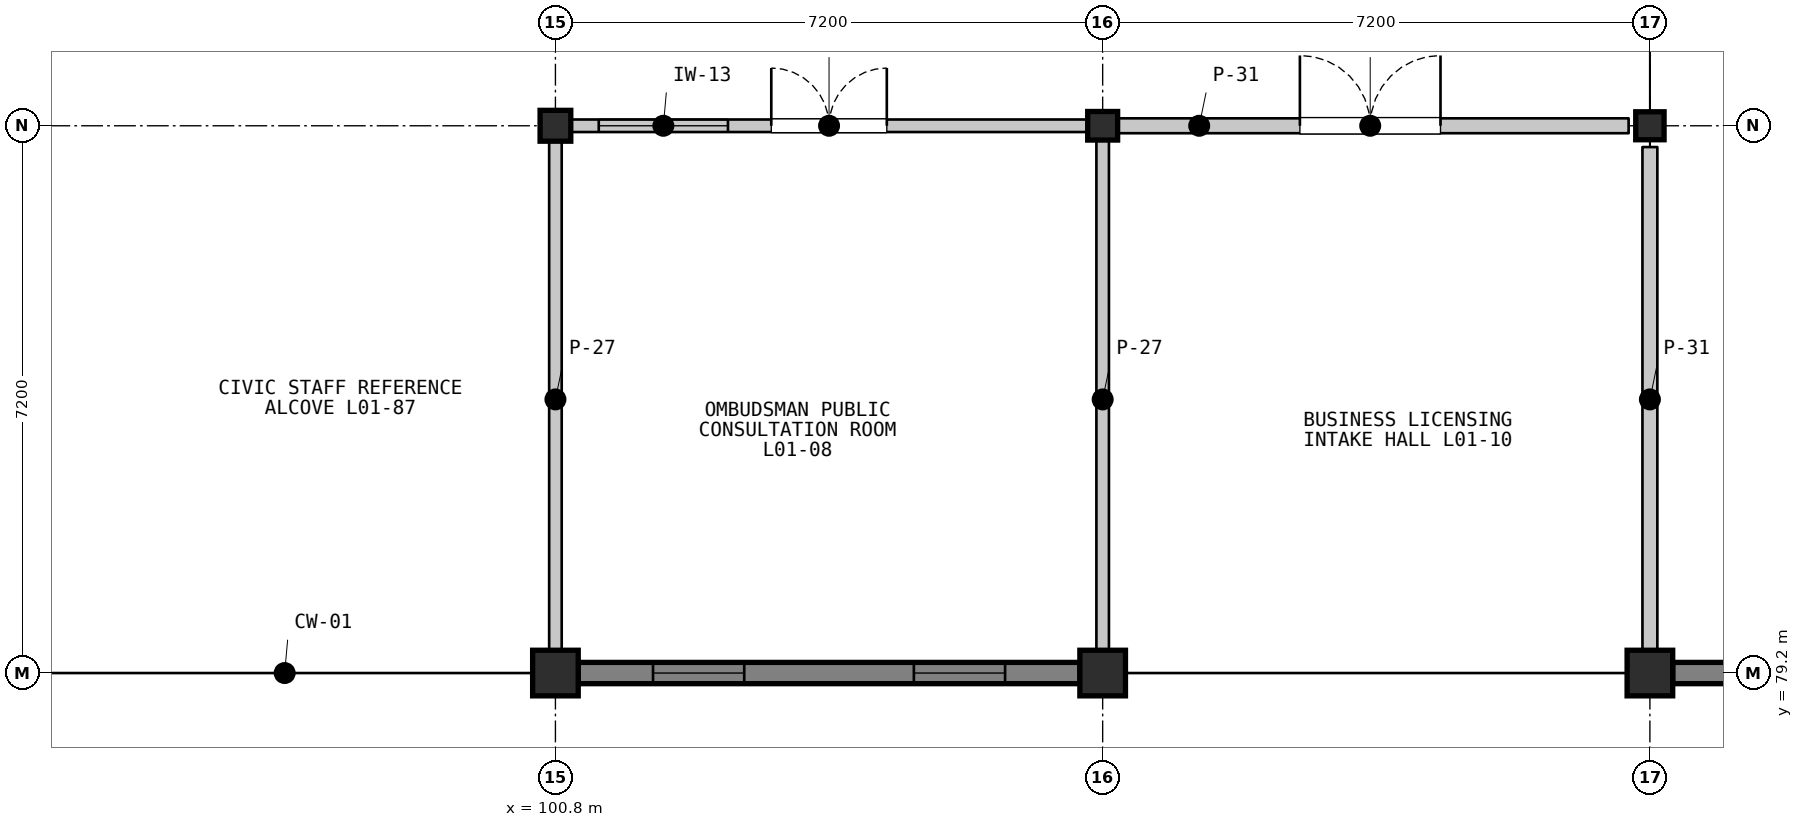
"""IFC4 building model, lengths in metres.
Left out: names, types, materials, properties, quantities, classifications, styles, units other than length and angle.
Written with IfcOpenShell. Run it as: python <this file> out.ifc"""

import sys

from ifc_helpers import new_model, si_unit, direction, frame, frame_2d, origin, origin_2d, place, context, subcontext, project, spatial, rectangle, i_section, extrude, element, fill, save


model = new_model("IFC4")
c1 = context("Model", 3, precision=1e-05, world=origin(), true_north=direction((0.0, 1.0)))
c2 = subcontext(c1, "Body", "Model", "MODEL_VIEW")
j1 = project(units=[si_unit("LENGTHUNIT", "METRE"), si_unit("PLANEANGLEUNIT", "RADIAN")], contexts=[c1])
p1 = place(None, origin())
s1 = spatial("IfcSite", under=j1, at=p1, CompositionType="ELEMENT")
p2 = place(p1, origin())
s2 = spatial("IfcBuilding", under=s1, at=p2, CompositionType="ELEMENT")
p3 = place(p2, origin())
s3 = spatial("IfcBuildingStorey", under=s2, at=p3, CompositionType="ELEMENT", Elevation=0.0)
p4 = place(p3, frame((100.8, 79.2, 0.0), z_axis=(0.0, 0.0, 1.0), x_axis=(1.0, 0.0, 0.0)))
e1 = element("IfcColumn", 1, at=p4, inside=s3, PredefinedType="COLUMN", context=c2, shape_type="SweptSolid", body=[
    extrude(rectangle(XDim=0.6, YDim=0.6, at=origin_2d()), origin(), (0.0, 0.0, 1.0), 5.4),
])
p5 = place(p3, frame((100.8, 86.4, 0.0), z_axis=(0.0, 0.0, 1.0), x_axis=(1.0, 0.0, 0.0)))
e2 = element("IfcColumn", 2, at=p5, inside=s3, PredefinedType="COLUMN", context=c2, shape_type="SweptSolid", body=[
    extrude(i_section(OverallWidth=0.404, OverallDepth=0.406, WebThickness=0.027, FlangeThickness=0.044, FilletRadius=0.015, at=origin_2d()), origin(), (0.0, 0.0, 1.0), 5.4),
])
p6 = place(p3, frame((108.0, 79.2, 0.0), z_axis=(0.0, 0.0, 1.0), x_axis=(1.0, 0.0, 0.0)))
e3 = element("IfcColumn", 3, at=p6, inside=s3, PredefinedType="COLUMN", context=c2, shape_type="SweptSolid", body=[
    extrude(rectangle(XDim=0.6, YDim=0.6, at=origin_2d()), origin(), (0.0, 0.0, 1.0), 5.4),
])
p7 = place(p3, frame((108.0, 86.4, 0.0), z_axis=(0.0, 0.0, 1.0), x_axis=(1.0, 0.0, 0.0)))
e4 = element("IfcColumn", 4, at=p7, inside=s3, PredefinedType="COLUMN", context=c2, shape_type="SweptSolid", body=[
    extrude(i_section(OverallWidth=0.394, OverallDepth=0.376, WebThickness=0.017, FlangeThickness=0.028, FilletRadius=0.015, at=origin_2d()), origin(), (0.0, 0.0, 1.0), 5.4),
])
p8 = place(p3, frame((115.2, 79.2, 0.0), z_axis=(0.0, 0.0, 1.0), x_axis=(1.0, 0.0, 0.0)))
e5 = element("IfcColumn", 5, at=p8, inside=s3, PredefinedType="COLUMN", context=c2, shape_type="SweptSolid", body=[
    extrude(rectangle(XDim=0.6, YDim=0.6, at=origin_2d()), origin(), (0.0, 0.0, 1.0), 5.4),
])
p9 = place(p3, frame((115.2, 86.4, 0.0), z_axis=(0.0, 0.0, 1.0), x_axis=(1.0, 0.0, 0.0)))
e6 = element("IfcColumn", 6, at=p9, inside=s3, PredefinedType="COLUMN", context=c2, shape_type="SweptSolid", body=[
    extrude(i_section(OverallWidth=0.373, OverallDepth=0.368, WebThickness=0.015, FlangeThickness=0.024, FilletRadius=0.015, at=origin_2d()), origin(), (0.0, 0.0, 1.0), 5.4),
])
p10 = place(p3, frame((107.7, 79.2, 0.0), z_axis=(0.0, 0.0, 1.0), x_axis=(-1.0, 0.0, 0.0)))
e7 = element("IfcWall", 7, at=p10, inside=s3, PredefinedType="SOLIDWALL", context=c2, shape_type="SweptSolid", body=[
    extrude(rectangle(XDim=6.6, YDim=0.28, at=frame_2d((3.3, 0.0))), origin(), (0.0, 0.0, 1.0), 4.438),
])
p11 = place(p10, frame((0.984, 0.0, 0.95)))
e8 = element("IfcOpeningElement", 8, at=p11, cuts=e7, PredefinedType="OPENING", context=c2, shape_type="SweptSolid", body=[
    extrude(rectangle(XDim=1.2, YDim=1.7, at=frame_2d((0.6, 0.85))), frame((0.0, 0.15, 0.0), z_axis=(0.0, -1.0, 0.0), x_axis=(1.0, 0.0, 0.0)), (0.0, 0.0, 1.0), 0.3),
])
p12 = place(p10, frame((4.416, 0.0, 0.95)))
e9 = element("IfcOpeningElement", 9, at=p12, cuts=e7, PredefinedType="OPENING", context=c2, shape_type="SweptSolid", body=[
    extrude(rectangle(XDim=1.2, YDim=1.7, at=frame_2d((0.6, 0.85))), frame((0.0, 0.15, 0.0), z_axis=(0.0, -1.0, 0.0), x_axis=(1.0, 0.0, 0.0)), (0.0, 0.0, 1.0), 0.3),
])
p13 = place(p3, frame((122.1, 79.2, 0.0), z_axis=(0.0, 0.0, 1.0), x_axis=(-1.0, 0.0, 0.0)))
e10 = element("IfcWall", 10, at=p13, inside=s3, PredefinedType="SOLIDWALL", context=c2, shape_type="SweptSolid", body=[
    extrude(rectangle(XDim=6.6, YDim=0.28, at=frame_2d((3.3, 0.0))), origin(), (0.0, 0.0, 1.0), 4.438),
])
p14 = place(p13, frame((0.984, 0.0, 0.95)))
e11 = element("IfcOpeningElement", 11, at=p14, cuts=e10, PredefinedType="OPENING", context=c2, shape_type="SweptSolid", body=[
    extrude(rectangle(XDim=1.2, YDim=1.7, at=frame_2d((0.6, 0.85))), frame((0.0, 0.15, 0.0), z_axis=(0.0, -1.0, 0.0), x_axis=(1.0, 0.0, 0.0)), (0.0, 0.0, 1.0), 0.3),
])
p15 = place(p13, frame((4.416, 0.0, 0.95)))
e12 = element("IfcOpeningElement", 12, at=p15, cuts=e10, PredefinedType="OPENING", context=c2, shape_type="SweptSolid", body=[
    extrude(rectangle(XDim=1.2, YDim=1.7, at=frame_2d((0.6, 0.85))), frame((0.0, 0.15, 0.0), z_axis=(0.0, -1.0, 0.0), x_axis=(1.0, 0.0, 0.0)), (0.0, 0.0, 1.0), 0.3),
])
p16 = place(p3, frame((100.92, 86.4, 0.0), z_axis=(0.0, 0.0, 1.0), x_axis=(1.0, 0.0, 0.0)))
e13 = element("IfcWall", 13, at=p16, inside=s3, PredefinedType="PARTITIONING", context=c2, shape_type="SweptSolid", body=[
    extrude(rectangle(XDim=6.96, YDim=0.165, at=frame_2d((3.48, 0.0))), origin(), (0.0, 0.0, 1.0), 4.428),
])
p17 = place(p16, frame((2.72, 0.0, 0.0)))
e14 = element("IfcOpeningElement", 14, at=p17, cuts=e13, PredefinedType="OPENING", context=c2, shape_type="SweptSolid", body=[
    extrude(rectangle(XDim=1.52, YDim=2.4, at=frame_2d((0.76, 1.2))), frame((0.0, 0.093, 0.0), z_axis=(0.0, -1.0, 0.0), x_axis=(1.0, 0.0, 0.0)), (0.0, 0.0, 1.0), 0.185),
])
p18 = place(p16, frame((0.45, 0.0, 1.05)))
e15 = element("IfcOpeningElement", 15, at=p18, cuts=e13, PredefinedType="OPENING", context=c2, shape_type="SweptSolid", body=[
    extrude(rectangle(XDim=1.7, YDim=1.18, at=frame_2d((0.85, 0.59))), frame((0.0, 0.093, 0.0), z_axis=(0.0, -1.0, 0.0), x_axis=(1.0, 0.0, 0.0)), (0.0, 0.0, 1.0), 0.185),
])
for number, where, z_axis, x_axis in (
    (16, (100.8, 79.32, 0.0), (0.0, 0.0, 1.0), (0.0, 1.0, 0.0)),
    (17, (108.0, 86.28, 0.0), (0.0, 0.0, 1.0), (0.0, -1.0, 0.0)),
):
    element("IfcWall", number, at=place(p3, frame(where, z_axis=z_axis, x_axis=x_axis)), inside=s3, PredefinedType="PARTITIONING", context=c2, shape_type="SweptSolid", body=[
        extrude(rectangle(XDim=6.96, YDim=0.165, at=frame_2d((3.48, 0.0))), origin(), (0.0, 0.0, 1.0), 4.428),
    ])
p19 = place(p3, frame((108.12, 86.4, 0.0), z_axis=(0.0, 0.0, 1.0), x_axis=(1.0, 0.0, 0.0)))
e18 = element("IfcWall", 18, at=p19, inside=s3, PredefinedType="PARTITIONING", context=c2, shape_type="SweptSolid", body=[
    extrude(rectangle(XDim=6.8, YDim=0.196, at=frame_2d((3.4, 0.0))), origin(), (0.0, 0.0, 1.0), 4.428),
])
p20 = place(p19, frame((2.475, 0.0, 0.0)))
e19 = element("IfcOpeningElement", 19, at=p20, cuts=e18, PredefinedType="OPENING", context=c2, shape_type="SweptSolid", body=[
    extrude(rectangle(XDim=1.85, YDim=2.45, at=frame_2d((0.925, 1.225))), frame((0.0, 0.108, 0.0), z_axis=(0.0, -1.0, 0.0), x_axis=(1.0, 0.0, 0.0)), (0.0, 0.0, 1.0), 0.216),
])
p21 = place(p3, frame((115.2, 86.12, 0.0), z_axis=(0.0, 0.0, 1.0), x_axis=(0.0, -1.0, 0.0)))
e20 = element("IfcWall", 20, at=p21, inside=s3, PredefinedType="PARTITIONING", context=c2, shape_type="SweptSolid", body=[
    extrude(rectangle(XDim=6.64, YDim=0.196, at=frame_2d((3.32, 0.0))), origin(), (0.0, 0.0, 1.0), 4.657),
])
p22 = place(p11, origin())
e21 = element("IfcWindow", 21, at=p22, inside=s3, PartitioningType="SINGLE_PANEL", PredefinedType="WINDOW", context=c2, shape_type="SweptSolid", body=[
    extrude(rectangle(XDim=1.2, YDim=1.7, at=frame_2d((0.6, 0.85))), frame((0.0, 0.03, 0.0), z_axis=(0.0, -1.0, 0.0), x_axis=(1.0, 0.0, 0.0)), (0.0, 0.0, 1.0), 0.06),
])
fill(e8, e21)
p23 = place(p12, origin())
e22 = element("IfcWindow", 22, at=p23, inside=s3, PartitioningType="SINGLE_PANEL", PredefinedType="WINDOW", context=c2, shape_type="SweptSolid", body=[
    extrude(rectangle(XDim=1.2, YDim=1.7, at=frame_2d((0.6, 0.85))), frame((0.0, 0.03, 0.0), z_axis=(0.0, -1.0, 0.0), x_axis=(1.0, 0.0, 0.0)), (0.0, 0.0, 1.0), 0.06),
])
fill(e9, e22)
p24 = place(p17, origin())
e23 = element("IfcDoor", 23, at=p24, inside=s3, OperationType="DOUBLE_DOOR_SINGLE_SWING", PredefinedType="DOOR", context=c2, shape_type="SweptSolid", body=[
    extrude(rectangle(XDim=1.52, YDim=2.4, at=frame_2d((0.76, 1.2))), frame((0.0, 0.025, 0.0), z_axis=(0.0, -1.0, 0.0), x_axis=(1.0, 0.0, 0.0)), (0.0, 0.0, 1.0), 0.05),
])
fill(e14, e23)
p25 = place(p18, origin())
e24 = element("IfcWindow", 24, at=p25, inside=s3, PartitioningType="SINGLE_PANEL", PredefinedType="WINDOW", context=c2, shape_type="SweptSolid", body=[
    extrude(rectangle(XDim=1.7, YDim=1.18, at=frame_2d((0.85, 0.59))), frame((0.0, 0.03, 0.0), z_axis=(0.0, -1.0, 0.0), x_axis=(1.0, 0.0, 0.0)), (0.0, 0.0, 1.0), 0.06),
])
fill(e15, e24)
p26 = place(p20, origin())
e25 = element("IfcDoor", 25, at=p26, inside=s3, OperationType="DOUBLE_DOOR_SINGLE_SWING", PredefinedType="DOOR", context=c2, shape_type="SweptSolid", body=[
    extrude(rectangle(XDim=1.85, YDim=2.45, at=frame_2d((0.925, 1.225))), frame((0.0, 0.025, 0.0), z_axis=(0.0, -1.0, 0.0), x_axis=(1.0, 0.0, 0.0)), (0.0, 0.0, 1.0), 0.05),
])
fill(e19, e25)
save(model, sys.argv[1])
